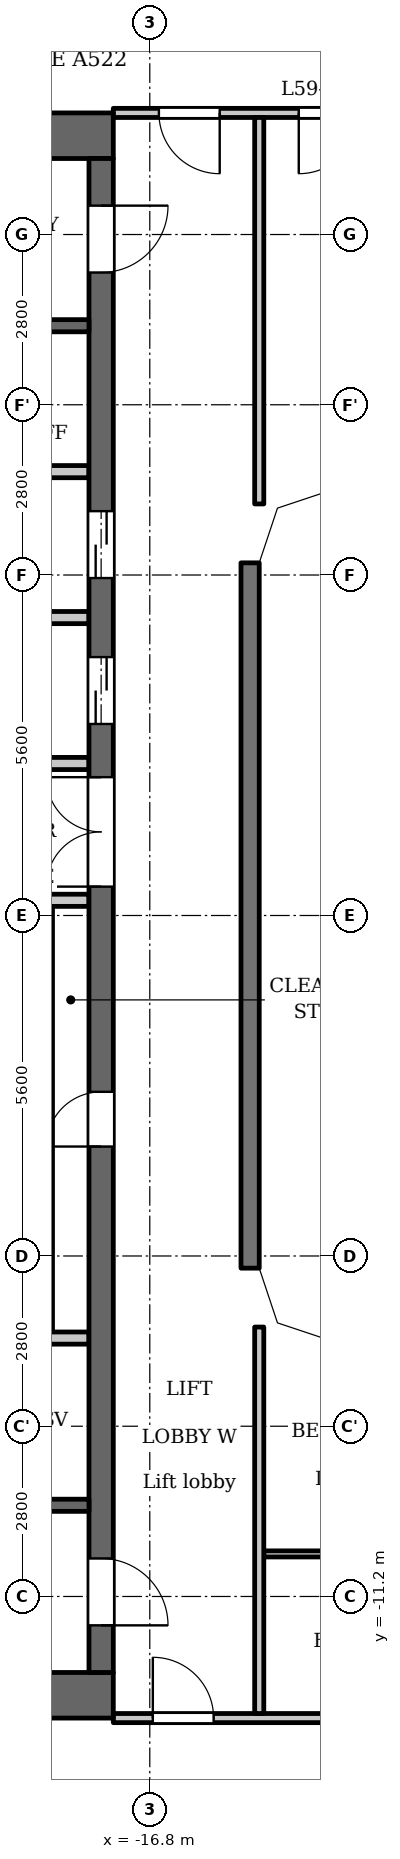
"""IFC4 building model, lengths in metres.
Left out: names, types, materials, properties, quantities, classifications, styles, units other than length and angle.
Written with IfcOpenShell. Run it as: python <this file> out.ifc"""

import sys

from ifc_helpers import new_model, si_unit, direction, frame, frame_2d, origin, place, context, subcontext, project, spatial, polyline, rectangle, outline, extrude, element, fill, save


model = new_model("IFC4")
c1 = context("Model", 3, precision=1e-05, world=origin(), true_north=direction((0.0, 1.0)))
c2 = subcontext(c1, "Body", "Model", "MODEL_VIEW")
j1 = project(units=[si_unit("LENGTHUNIT", "METRE"), si_unit("PLANEANGLEUNIT", "RADIAN")], contexts=[c1])
p1 = place(None, origin())
s1 = spatial("IfcSite", under=j1, at=p1, CompositionType="ELEMENT")
p2 = place(p1, origin())
s2 = spatial("IfcBuilding", under=s1, at=p2, CompositionType="ELEMENT")
p3 = place(p2, frame((0.0, 0.0, 227.4)))
s3 = spatial("IfcBuildingStorey", under=s2, at=p3, CompositionType="ELEMENT", Elevation=227.4)
p4 = place(p3, frame((-15.15, -5.8, 0.0), z_axis=(0.0, 0.0, 1.0), x_axis=(0.0, 1.0, 0.0)))
e1 = element("IfcWall", 1, at=p4, inside=s3, PredefinedType="SOLIDWALL", context=c2, shape_type="SweptSolid", body=[
    extrude(rectangle(XDim=11.6, YDim=0.3, at=frame_2d((5.8, 0.0))), origin(), (0.0, 0.0, 1.0), 3.15),
])
for number, where, z_axis, x_axis in (
    (2, (-17.4, 12.825, 0.0), (0.0, 0.0, 1.0), (-1.0, 0.0, 0.0)),
    (3, (-17.4, -12.825, 0.0), (0.0, 0.0, 1.0), (-1.0, 0.0, 0.0)),
):
    element("IfcWall", number, at=place(p3, frame(where, z_axis=z_axis, x_axis=x_axis)), inside=s3, PredefinedType="SHEAR", context=c2, shape_type="SweptSolid", body=[
        extrude(rectangle(XDim=7.6, YDim=0.75, at=frame_2d((3.8, 0.0))), origin(), (0.0, 0.0, 1.0), 3.15),
    ])
p5 = place(p3, frame((-17.6, -12.45, 0.0), z_axis=(0.0, 0.0, 1.0), x_axis=(0.0, 1.0, 0.0)))
e4 = element("IfcWall", 4, at=p5, inside=s3, PredefinedType="SHEAR", context=c2, shape_type="SweptSolid", body=[
    extrude(rectangle(XDim=24.9, YDim=0.4, at=frame_2d((12.45, 0.0))), origin(), (0.0, 0.0, 1.0), 3.15),
])
p6 = place(p5, frame((8.65, 0.0, 0.0)))
e5 = element("IfcOpeningElement", 5, at=p6, cuts=e4, PredefinedType="OPENING", context=c2, shape_type="SweptSolid", body=[
    extrude(rectangle(XDim=0.9, YDim=2.1, at=frame_2d((0.45, 1.05))), frame((0.0, 0.21, 0.0), z_axis=(0.0, -1.0, 0.0), x_axis=(1.0, 0.0, 0.0)), (0.0, 0.0, 1.0), 0.42),
])
p7 = place(p5, frame((15.6, 0.0, 0.0)))
e6 = element("IfcOpeningElement", 6, at=p7, cuts=e4, PredefinedType="OPENING", context=c2, shape_type="SweptSolid", body=[
    extrude(rectangle(XDim=1.1, YDim=2.1, at=frame_2d((0.55, 1.05))), frame((0.0, 0.21, 0.0), z_axis=(0.0, -1.0, 0.0), x_axis=(1.0, 0.0, 0.0)), (0.0, 0.0, 1.0), 0.42),
])
p8 = place(p5, frame((18.0, 0.0, 0.0)))
e7 = element("IfcOpeningElement", 7, at=p8, cuts=e4, PredefinedType="OPENING", context=c2, shape_type="SweptSolid", body=[
    extrude(rectangle(XDim=1.1, YDim=2.1, at=frame_2d((0.55, 1.05))), frame((0.0, 0.21, 0.0), z_axis=(0.0, -1.0, 0.0), x_axis=(1.0, 0.0, 0.0)), (0.0, 0.0, 1.0), 0.42),
])
p9 = place(p5, frame((23.025, 0.0, 0.0)))
e8 = element("IfcOpeningElement", 8, at=p9, cuts=e4, PredefinedType="OPENING", context=c2, shape_type="SweptSolid", body=[
    extrude(rectangle(XDim=1.1, YDim=2.1, at=frame_2d((0.55, 1.05))), frame((0.0, 0.21, 0.0), z_axis=(0.0, -1.0, 0.0), x_axis=(1.0, 0.0, 0.0)), (0.0, 0.0, 1.0), 0.42),
])
p10 = place(p5, frame((0.775, 0.0, 0.0)))
e9 = element("IfcOpeningElement", 9, at=p10, cuts=e4, PredefinedType="OPENING", context=c2, shape_type="SweptSolid", body=[
    extrude(rectangle(XDim=1.1, YDim=2.1, at=frame_2d((0.55, 1.05))), frame((0.0, 0.21, 0.0), z_axis=(0.0, -1.0, 0.0), x_axis=(1.0, 0.0, 0.0)), (0.0, 0.0, 1.0), 0.42),
])
p11 = place(p5, frame((12.925, 0.0, 0.0)))
e10 = element("IfcOpeningElement", 10, at=p11, cuts=e4, PredefinedType="OPENING", context=c2, shape_type="SweptSolid", body=[
    extrude(rectangle(XDim=1.8, YDim=2.1, at=frame_2d((0.9, 1.05))), frame((0.0, 0.21, 0.0), z_axis=(0.0, -1.0, 0.0), x_axis=(1.0, 0.0, 0.0)), (0.0, 0.0, 1.0), 0.42),
])
p12 = place(p3, frame((-17.8, -9.7, 0.0), z_axis=(0.0, 0.0, 1.0), x_axis=(-1.0, 0.0, 0.0)))
e11 = element("IfcWall", 11, at=p12, inside=s3, PredefinedType="SHEAR", context=c2, shape_type="SweptSolid", body=[
    extrude(rectangle(XDim=5.65, YDim=0.2, at=frame_2d((2.825, 0.0))), origin(), (0.0, 0.0, 1.0), 3.15),
])
p13 = place(p12, frame((0.85, 0.0, 0.0)))
e12 = element("IfcOpeningElement", 12, at=p13, cuts=e11, PredefinedType="OPENING", context=c2, shape_type="SweptSolid", body=[
    extrude(rectangle(XDim=1.1, YDim=2.1, at=frame_2d((0.55, 1.05))), frame((0.0, 0.11, 0.0), z_axis=(0.0, -1.0, 0.0), x_axis=(1.0, 0.0, 0.0)), (0.0, 0.0, 1.0), 0.22),
])
p14 = place(p12, frame((3.75, 0.0, 0.0)))
e13 = element("IfcOpeningElement", 13, at=p14, cuts=e11, PredefinedType="OPENING", context=c2, shape_type="SweptSolid", body=[
    extrude(rectangle(XDim=1.1, YDim=2.1, at=frame_2d((0.55, 1.05))), frame((0.0, 0.11, 0.0), z_axis=(0.0, -1.0, 0.0), x_axis=(1.0, 0.0, 0.0)), (0.0, 0.0, 1.0), 0.22),
])
p15 = place(p3, frame((-17.8, -6.95, 0.0), z_axis=(0.0, 0.0, 1.0), x_axis=(-1.0, 0.0, 0.0)))
e14 = element("IfcWall", 14, at=p15, inside=s3, PredefinedType="PARTITIONING", context=c2, shape_type="SweptSolid", body=[
    extrude(rectangle(XDim=2.8, YDim=0.2, at=frame_2d((1.4, 0.0))), origin(), (0.0, 0.0, 1.0), 3.15),
])
p16 = place(p3, frame((-17.8, 0.25, 0.0), z_axis=(0.0, 0.0, 1.0), x_axis=(-1.0, 0.0, 0.0)))
e15 = element("IfcWall", 15, at=p16, inside=s3, PredefinedType="PARTITIONING", context=c2, shape_type="SweptSolid", body=[
    extrude(rectangle(XDim=3.0, YDim=0.2, at=frame_2d((1.5, 0.0))), origin(), (0.0, 0.0, 1.0), 3.15),
])
p17 = place(p16, frame((1.35, 0.0, 0.0)))
e16 = element("IfcOpeningElement", 16, at=p17, cuts=e15, PredefinedType="OPENING", context=c2, shape_type="SweptSolid", body=[
    extrude(rectangle(XDim=0.9, YDim=2.1, at=frame_2d((0.45, 1.05))), frame((0.0, 0.11, 0.0), z_axis=(0.0, -1.0, 0.0), x_axis=(1.0, 0.0, 0.0)), (0.0, 0.0, 1.0), 0.22),
])
p18 = place(p3, frame((-17.8, 2.5, 0.0), z_axis=(0.0, 0.0, 1.0), x_axis=(-1.0, 0.0, 0.0)))
e17 = element("IfcWall", 17, at=p18, inside=s3, PredefinedType="PARTITIONING", context=c2, shape_type="SweptSolid", body=[
    extrude(rectangle(XDim=3.0, YDim=0.2, at=frame_2d((1.5, 0.0))), origin(), (0.0, 0.0, 1.0), 3.15),
])
for number, where, z_axis, x_axis in (
    (18, (-17.8, 4.9, 0.0), (0.0, 0.0, 1.0), (-1.0, 0.0, 0.0)),
    (19, (-17.8, 7.3, 0.0), (0.0, 0.0, 1.0), (-1.0, 0.0, 0.0)),
):
    element("IfcWall", number, at=place(p3, frame(where, z_axis=z_axis, x_axis=x_axis)), inside=s3, PredefinedType="PARTITIONING", context=c2, shape_type="SweptSolid", body=[
        extrude(rectangle(XDim=2.8, YDim=0.2, at=frame_2d((1.4, 0.0))), origin(), (0.0, 0.0, 1.0), 3.15),
    ])
p19 = place(p3, frame((-17.8, 9.7, 0.0), z_axis=(0.0, 0.0, 1.0), x_axis=(-1.0, 0.0, 0.0)))
e20 = element("IfcWall", 20, at=p19, inside=s3, PredefinedType="SHEAR", context=c2, shape_type="SweptSolid", body=[
    extrude(rectangle(XDim=5.65, YDim=0.2, at=frame_2d((2.825, 0.0))), origin(), (0.0, 0.0, 1.0), 3.15),
])
p20 = place(p19, frame((0.85, 0.0, 0.0)))
e21 = element("IfcOpeningElement", 21, at=p20, cuts=e20, PredefinedType="OPENING", context=c2, shape_type="SweptSolid", body=[
    extrude(rectangle(XDim=1.1, YDim=2.1, at=frame_2d((0.55, 1.05))), frame((0.0, 0.11, 0.0), z_axis=(0.0, -1.0, 0.0), x_axis=(1.0, 0.0, 0.0)), (0.0, 0.0, 1.0), 0.22),
])
p21 = place(p19, frame((3.75, 0.0, 0.0)))
e22 = element("IfcOpeningElement", 22, at=p21, cuts=e20, PredefinedType="OPENING", context=c2, shape_type="SweptSolid", body=[
    extrude(rectangle(XDim=1.1, YDim=2.1, at=frame_2d((0.55, 1.05))), frame((0.0, 0.11, 0.0), z_axis=(0.0, -1.0, 0.0), x_axis=(1.0, 0.0, 0.0)), (0.0, 0.0, 1.0), 0.22),
])
p22 = place(p3, frame((-17.4, -13.2, 0.0), z_axis=(0.0, 0.0, 1.0), x_axis=(1.0, 0.0, 0.0)))
e23 = element("IfcWall", 23, at=p22, inside=s3, PredefinedType="PARTITIONING", context=c2, shape_type="SweptSolid", body=[
    extrude(rectangle(XDim=34.8, YDim=0.15, at=frame_2d((17.4, 0.0))), origin(), (0.0, 0.0, 1.0), 3.15),
])
p23 = place(p22, frame((0.65, 0.0, 0.0)))
e24 = element("IfcOpeningElement", 24, at=p23, cuts=e23, PredefinedType="OPENING", context=c2, shape_type="SweptSolid", body=[
    extrude(rectangle(XDim=1.0, YDim=2.1, at=frame_2d((0.5, 1.05))), frame((0.0, 0.085, 0.0), z_axis=(0.0, -1.0, 0.0), x_axis=(1.0, 0.0, 0.0)), (0.0, 0.0, 1.0), 0.17),
])
p24 = place(p22, frame((33.05, 0.0, 0.0)))
e25 = element("IfcOpeningElement", 25, at=p24, cuts=e23, PredefinedType="OPENING", context=c2, shape_type="SweptSolid", body=[
    extrude(rectangle(XDim=1.0, YDim=2.1, at=frame_2d((0.5, 1.05))), frame((0.0, 0.085, 0.0), z_axis=(0.0, -1.0, 0.0), x_axis=(1.0, 0.0, 0.0)), (0.0, 0.0, 1.0), 0.17),
])
p25 = place(p22, frame((10.15, 0.0, 0.0)))
e26 = element("IfcOpeningElement", 26, at=p25, cuts=e23, PredefinedType="OPENING", context=c2, shape_type="SweptSolid", body=[
    extrude(rectangle(XDim=1.0, YDim=2.1, at=frame_2d((0.5, 1.05))), frame((0.0, 0.085, 0.0), z_axis=(0.0, -1.0, 0.0), x_axis=(1.0, 0.0, 0.0)), (0.0, 0.0, 1.0), 0.17),
])
p26 = place(p22, frame((12.5, 0.0, 0.0)))
e27 = element("IfcOpeningElement", 27, at=p26, cuts=e23, PredefinedType="OPENING", context=c2, shape_type="SweptSolid", body=[
    extrude(rectangle(XDim=1.0, YDim=2.1, at=frame_2d((0.5, 1.05))), frame((0.0, 0.085, 0.0), z_axis=(0.0, -1.0, 0.0), x_axis=(1.0, 0.0, 0.0)), (0.0, 0.0, 1.0), 0.17),
])
p27 = place(p22, frame((18.0, 0.0, 0.0)))
e28 = element("IfcOpeningElement", 28, at=p27, cuts=e23, PredefinedType="OPENING", context=c2, shape_type="SweptSolid", body=[
    extrude(rectangle(XDim=1.0, YDim=2.1, at=frame_2d((0.5, 1.05))), frame((0.0, 0.085, 0.0), z_axis=(0.0, -1.0, 0.0), x_axis=(1.0, 0.0, 0.0)), (0.0, 0.0, 1.0), 0.17),
])
p28 = place(p22, frame((30.75, 0.0, 0.0)))
e29 = element("IfcOpeningElement", 29, at=p28, cuts=e23, PredefinedType="OPENING", context=c2, shape_type="SweptSolid", body=[
    extrude(rectangle(XDim=1.0, YDim=2.1, at=frame_2d((0.5, 1.05))), frame((0.0, 0.085, 0.0), z_axis=(0.0, -1.0, 0.0), x_axis=(1.0, 0.0, 0.0)), (0.0, 0.0, 1.0), 0.17),
])
p29 = place(p3, frame((-14.925, -10.5, 0.0), z_axis=(0.0, 0.0, 1.0), x_axis=(1.0, 0.0, 0.0)))
e30 = element("IfcWall", 30, at=p29, inside=s3, PredefinedType="PARTITIONING", context=c2, shape_type="SweptSolid", body=[
    extrude(rectangle(XDim=29.85, YDim=0.1, at=frame_2d((14.925, 0.0))), origin(), (0.0, 0.0, 1.0), 3.15),
])
p30 = place(p29, frame((2.325, 0.0, 0.0)))
e31 = element("IfcOpeningElement", 31, at=p30, cuts=e30, PredefinedType="OPENING", context=c2, shape_type="SweptSolid", body=[
    extrude(rectangle(XDim=0.8, YDim=2.1, at=frame_2d((0.4, 1.05))), frame((0.0, 0.06, 0.0), z_axis=(0.0, -1.0, 0.0), x_axis=(1.0, 0.0, 0.0)), (0.0, 0.0, 1.0), 0.12),
])
p31 = place(p29, frame((7.775, 0.0, 0.0)))
e32 = element("IfcOpeningElement", 32, at=p31, cuts=e30, PredefinedType="OPENING", context=c2, shape_type="SweptSolid", body=[
    extrude(rectangle(XDim=0.9, YDim=2.1, at=frame_2d((0.45, 1.05))), frame((0.0, 0.06, 0.0), z_axis=(0.0, -1.0, 0.0), x_axis=(1.0, 0.0, 0.0)), (0.0, 0.0, 1.0), 0.12),
])
p32 = place(p29, frame((13.575, 0.0, 0.0)))
e33 = element("IfcOpeningElement", 33, at=p32, cuts=e30, PredefinedType="OPENING", context=c2, shape_type="SweptSolid", body=[
    extrude(rectangle(XDim=0.8, YDim=2.1, at=frame_2d((0.4, 1.05))), frame((0.0, 0.06, 0.0), z_axis=(0.0, -1.0, 0.0), x_axis=(1.0, 0.0, 0.0)), (0.0, 0.0, 1.0), 0.12),
])
p33 = place(p29, frame((10.125, 0.0, 0.0)))
e34 = element("IfcOpeningElement", 34, at=p33, cuts=e30, PredefinedType="OPENING", context=c2, shape_type="SweptSolid", body=[
    extrude(rectangle(XDim=0.9, YDim=2.1, at=frame_2d((0.45, 1.05))), frame((0.0, 0.06, 0.0), z_axis=(0.0, -1.0, 0.0), x_axis=(1.0, 0.0, 0.0)), (0.0, 0.0, 1.0), 0.12),
])
p34 = place(p29, frame((18.825, 0.0, 0.0)))
e35 = element("IfcOpeningElement", 35, at=p34, cuts=e30, PredefinedType="OPENING", context=c2, shape_type="SweptSolid", body=[
    extrude(rectangle(XDim=0.8, YDim=2.1, at=frame_2d((0.4, 1.05))), frame((0.0, 0.06, 0.0), z_axis=(0.0, -1.0, 0.0), x_axis=(1.0, 0.0, 0.0)), (0.0, 0.0, 1.0), 0.12),
])
p35 = place(p29, frame((15.625, 0.0, 0.0)))
e36 = element("IfcOpeningElement", 36, at=p35, cuts=e30, PredefinedType="OPENING", context=c2, shape_type="SweptSolid", body=[
    extrude(rectangle(XDim=0.9, YDim=2.1, at=frame_2d((0.45, 1.05))), frame((0.0, 0.06, 0.0), z_axis=(0.0, -1.0, 0.0), x_axis=(1.0, 0.0, 0.0)), (0.0, 0.0, 1.0), 0.12),
])
p36 = place(p29, frame((24.675, 0.0, 0.0)))
e37 = element("IfcOpeningElement", 37, at=p36, cuts=e30, PredefinedType="OPENING", context=c2, shape_type="SweptSolid", body=[
    extrude(rectangle(XDim=0.8, YDim=2.1, at=frame_2d((0.4, 1.05))), frame((0.0, 0.06, 0.0), z_axis=(0.0, -1.0, 0.0), x_axis=(1.0, 0.0, 0.0)), (0.0, 0.0, 1.0), 0.12),
])
p37 = place(p29, frame((28.375, 0.0, 0.0)))
e38 = element("IfcOpeningElement", 38, at=p37, cuts=e30, PredefinedType="OPENING", context=c2, shape_type="SweptSolid", body=[
    extrude(rectangle(XDim=0.9, YDim=2.1, at=frame_2d((0.45, 1.05))), frame((0.0, 0.06, 0.0), z_axis=(0.0, -1.0, 0.0), x_axis=(1.0, 0.0, 0.0)), (0.0, 0.0, 1.0), 0.12),
])
p38 = place(p3, frame((-17.4, 13.2, 0.0), z_axis=(0.0, 0.0, 1.0), x_axis=(1.0, 0.0, 0.0)))
e39 = element("IfcWall", 39, at=p38, inside=s3, PredefinedType="PARTITIONING", context=c2, shape_type="SweptSolid", body=[
    extrude(rectangle(XDim=34.8, YDim=0.15, at=frame_2d((17.4, 0.0))), origin(), (0.0, 0.0, 1.0), 3.15),
])
p39 = place(p38, frame((0.75, 0.0, 0.0)))
e40 = element("IfcOpeningElement", 40, at=p39, cuts=e39, PredefinedType="OPENING", context=c2, shape_type="SweptSolid", body=[
    extrude(rectangle(XDim=1.0, YDim=2.1, at=frame_2d((0.5, 1.05))), frame((0.0, 0.085, 0.0), z_axis=(0.0, -1.0, 0.0), x_axis=(1.0, 0.0, 0.0)), (0.0, 0.0, 1.0), 0.17),
])
p40 = place(p38, frame((33.15, 0.0, 0.0)))
e41 = element("IfcOpeningElement", 41, at=p40, cuts=e39, PredefinedType="OPENING", context=c2, shape_type="SweptSolid", body=[
    extrude(rectangle(XDim=1.0, YDim=2.1, at=frame_2d((0.5, 1.05))), frame((0.0, 0.085, 0.0), z_axis=(0.0, -1.0, 0.0), x_axis=(1.0, 0.0, 0.0)), (0.0, 0.0, 1.0), 0.17),
])
p41 = place(p38, frame((3.05, 0.0, 0.0)))
e42 = element("IfcOpeningElement", 42, at=p41, cuts=e39, PredefinedType="OPENING", context=c2, shape_type="SweptSolid", body=[
    extrude(rectangle(XDim=1.0, YDim=2.1, at=frame_2d((0.5, 1.05))), frame((0.0, 0.085, 0.0), z_axis=(0.0, -1.0, 0.0), x_axis=(1.0, 0.0, 0.0)), (0.0, 0.0, 1.0), 0.17),
])
p42 = place(p38, frame((10.1, 0.0, 0.0)))
e43 = element("IfcOpeningElement", 43, at=p42, cuts=e39, PredefinedType="OPENING", context=c2, shape_type="SweptSolid", body=[
    extrude(rectangle(XDim=1.0, YDim=2.1, at=frame_2d((0.5, 1.05))), frame((0.0, 0.085, 0.0), z_axis=(0.0, -1.0, 0.0), x_axis=(1.0, 0.0, 0.0)), (0.0, 0.0, 1.0), 0.17),
])
p43 = place(p38, frame((12.45, 0.0, 0.0)))
e44 = element("IfcOpeningElement", 44, at=p43, cuts=e39, PredefinedType="OPENING", context=c2, shape_type="SweptSolid", body=[
    extrude(rectangle(XDim=1.0, YDim=2.1, at=frame_2d((0.5, 1.05))), frame((0.0, 0.085, 0.0), z_axis=(0.0, -1.0, 0.0), x_axis=(1.0, 0.0, 0.0)), (0.0, 0.0, 1.0), 0.17),
])
p44 = place(p38, frame((21.3, 0.0, 0.0)))
e45 = element("IfcOpeningElement", 45, at=p44, cuts=e39, PredefinedType="OPENING", context=c2, shape_type="SweptSolid", body=[
    extrude(rectangle(XDim=1.0, YDim=2.1, at=frame_2d((0.5, 1.05))), frame((0.0, 0.085, 0.0), z_axis=(0.0, -1.0, 0.0), x_axis=(1.0, 0.0, 0.0)), (0.0, 0.0, 1.0), 0.17),
])
p45 = place(p38, frame((23.65, 0.0, 0.0)))
e46 = element("IfcOpeningElement", 46, at=p45, cuts=e39, PredefinedType="OPENING", context=c2, shape_type="SweptSolid", body=[
    extrude(rectangle(XDim=1.0, YDim=2.1, at=frame_2d((0.5, 1.05))), frame((0.0, 0.085, 0.0), z_axis=(0.0, -1.0, 0.0), x_axis=(1.0, 0.0, 0.0)), (0.0, 0.0, 1.0), 0.17),
])
p46 = place(p38, frame((30.75, 0.0, 0.0)))
e47 = element("IfcOpeningElement", 47, at=p46, cuts=e39, PredefinedType="OPENING", context=c2, shape_type="SweptSolid", body=[
    extrude(rectangle(XDim=1.0, YDim=2.1, at=frame_2d((0.5, 1.05))), frame((0.0, 0.085, 0.0), z_axis=(0.0, -1.0, 0.0), x_axis=(1.0, 0.0, 0.0)), (0.0, 0.0, 1.0), 0.17),
])
for number, where, z_axis, x_axis in (
    (48, (-15.0, -13.125, 0.0), (0.0, 0.0, 1.0), (0.0, 1.0, 0.0)),
    (49, (-15.0, 6.769, 0.0), (0.0, 0.0, 1.0), (0.0, 1.0, 0.0)),
):
    element("IfcWall", number, at=place(p3, frame(where, z_axis=z_axis, x_axis=x_axis)), inside=s3, PredefinedType="PARTITIONING", context=c2, shape_type="SweptSolid", body=[
        extrude(rectangle(XDim=6.356, YDim=0.15, at=frame_2d((3.178, 0.0))), origin(), (0.0, 0.0, 1.0), 3.15),
    ])
p47 = place(p3, origin())
e50 = element("IfcWall", 50, at=p47, inside=s3, PredefinedType="SOLIDWALL", context=c2, shape_type="SweptSolid", body=[
    extrude(outline(polyline([(-13.849, 7.3), (-14.937, 6.937), (-15.3, 5.849), (-15.3, 5.8), (-15.0, 5.8), (-14.7, 6.7), (-13.8, 7.0), (-13.8, 7.3), (-13.849, 7.3)])), origin(), (0.0, 0.0, 1.0), 3.15),
])
e51 = element("IfcWall", 51, at=p47, inside=s3, PredefinedType="SOLIDWALL", context=c2, shape_type="SweptSolid", body=[
    extrude(outline(polyline([(-14.937, -6.937), (-13.849, -7.3), (-13.8, -7.3), (-13.8, -7.0), (-14.7, -6.7), (-15.0, -5.8), (-15.3, -5.8), (-15.3, -5.849), (-14.937, -6.937)])), origin(), (0.0, 0.0, 1.0), 3.15),
])
p48 = place(p6, origin())
e52 = element("IfcDoor", 52, at=p48, inside=s3, OperationType="SINGLE_SWING_RIGHT", PredefinedType="DOOR", context=c2, shape_type="SweptSolid", body=[
    extrude(rectangle(XDim=0.9, YDim=2.1, at=frame_2d((0.45, 1.05))), frame((0.0, 0.025, 0.0), z_axis=(0.0, -1.0, 0.0), x_axis=(1.0, 0.0, 0.0)), (0.0, 0.0, 1.0), 0.05),
])
fill(e5, e52)
p49 = place(p7, origin())
e53 = element("IfcDoor", 53, at=p49, inside=s3, OperationType="DOUBLE_DOOR_SLIDING", PredefinedType="DOOR", context=c2, shape_type="SweptSolid", body=[
    extrude(rectangle(XDim=1.1, YDim=2.1, at=frame_2d((0.55, 1.05))), frame((0.0, 0.025, 0.0), z_axis=(0.0, -1.0, 0.0), x_axis=(1.0, 0.0, 0.0)), (0.0, 0.0, 1.0), 0.05),
])
fill(e6, e53)
p50 = place(p8, origin())
e54 = element("IfcDoor", 54, at=p50, inside=s3, OperationType="DOUBLE_DOOR_SLIDING", PredefinedType="DOOR", context=c2, shape_type="SweptSolid", body=[
    extrude(rectangle(XDim=1.1, YDim=2.1, at=frame_2d((0.55, 1.05))), frame((0.0, 0.025, 0.0), z_axis=(0.0, -1.0, 0.0), x_axis=(1.0, 0.0, 0.0)), (0.0, 0.0, 1.0), 0.05),
])
fill(e7, e54)
p51 = place(p9, origin())
e55 = element("IfcDoor", 55, at=p51, inside=s3, OperationType="SINGLE_SWING_RIGHT", PredefinedType="DOOR", context=c2, shape_type="SweptSolid", body=[
    extrude(rectangle(XDim=1.1, YDim=2.1, at=frame_2d((0.55, 1.05))), frame((0.0, 0.025, 0.0), z_axis=(0.0, -1.0, 0.0), x_axis=(1.0, 0.0, 0.0)), (0.0, 0.0, 1.0), 0.05),
])
fill(e8, e55)
p52 = place(p10, origin())
e56 = element("IfcDoor", 56, at=p52, inside=s3, OperationType="SINGLE_SWING_LEFT", PredefinedType="DOOR", context=c2, shape_type="SweptSolid", body=[
    extrude(rectangle(XDim=1.1, YDim=2.1, at=frame_2d((0.55, 1.05))), frame((0.0, 0.025, 0.0), z_axis=(0.0, -1.0, 0.0), x_axis=(1.0, 0.0, 0.0)), (0.0, 0.0, 1.0), 0.05),
])
fill(e9, e56)
p53 = place(p11, origin())
e57 = element("IfcDoor", 57, at=p53, inside=s3, OperationType="DOUBLE_DOOR_SINGLE_SWING", PredefinedType="DOOR", context=c2, shape_type="SweptSolid", body=[
    extrude(rectangle(XDim=1.8, YDim=2.1, at=frame_2d((0.9, 1.05))), frame((0.0, 0.025, 0.0), z_axis=(0.0, -1.0, 0.0), x_axis=(1.0, 0.0, 0.0)), (0.0, 0.0, 1.0), 0.05),
])
fill(e10, e57)
p54 = place(p39, origin())
e58 = element("IfcDoor", 58, at=p54, inside=s3, OperationType="SINGLE_SWING_RIGHT", PredefinedType="DOOR", context=c2, shape_type="SweptSolid", body=[
    extrude(rectangle(XDim=1.0, YDim=2.1, at=frame_2d((0.5, 1.05))), frame((0.0, 0.025, 0.0), z_axis=(0.0, -1.0, 0.0), x_axis=(1.0, 0.0, 0.0)), (0.0, 0.0, 1.0), 0.05),
])
fill(e40, e58)
p55 = place(p23, origin())
e59 = element("IfcDoor", 59, at=p55, inside=s3, OperationType="SINGLE_SWING_RIGHT", PredefinedType="DOOR", context=c2, shape_type="SweptSolid", body=[
    extrude(rectangle(XDim=1.0, YDim=2.1, at=frame_2d((0.5, 1.05))), frame((0.0, 0.025, 0.0), z_axis=(0.0, -1.0, 0.0), x_axis=(1.0, 0.0, 0.0)), (0.0, 0.0, 1.0), 0.05),
])
fill(e24, e59)
p56 = place(p41, origin())
e60 = element("IfcDoor", 60, at=p56, inside=s3, OperationType="SINGLE_SWING_LEFT", PredefinedType="DOOR", context=c2, shape_type="SweptSolid", body=[
    extrude(rectangle(XDim=1.0, YDim=2.1, at=frame_2d((0.5, 1.05))), frame((0.0, 0.025, 0.0), z_axis=(0.0, -1.0, 0.0), x_axis=(1.0, 0.0, 0.0)), (0.0, 0.0, 1.0), 0.05),
])
fill(e42, e60)
save(model, sys.argv[1])
